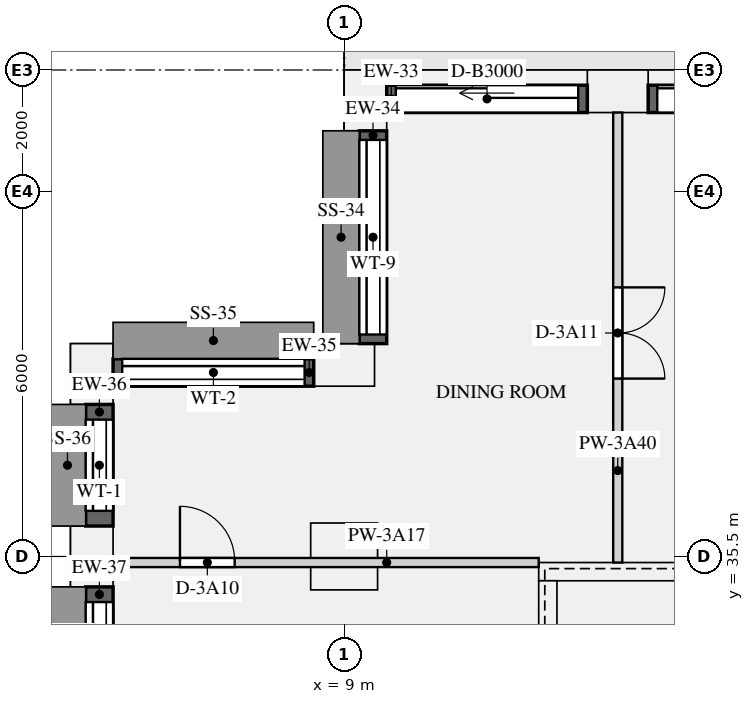
"""IFC4 building model, lengths in metres.
Left out: names, types, materials, properties, quantities, classifications, styles, units other than length and angle.
Written with IfcOpenShell. Run it as: python <this file> out.ifc"""

import sys

from ifc_helpers import new_model, si_unit, direction, frame, frame_2d, origin, origin_2d, place, context, subcontext, project, spatial, rectangle, extrude, element, fill, save


model = new_model("IFC4")
c1 = context("Model", 3, precision=1e-05, world=origin(), true_north=direction((0.0, 1.0)))
c2 = subcontext(c1, "Body", "Model", "MODEL_VIEW")
j1 = project(units=[si_unit("LENGTHUNIT", "METRE"), si_unit("PLANEANGLEUNIT", "RADIAN")], contexts=[c1])
p1 = place(None, origin())
s1 = spatial("IfcSite", under=j1, at=p1, CompositionType="ELEMENT")
p2 = place(p1, origin())
s2 = spatial("IfcBuilding", under=s1, at=p2, CompositionType="ELEMENT")
p3 = place(p2, frame((0.0, 0.0, 144.45)))
s3 = spatial("IfcBuildingStorey", under=s2, at=p3, CompositionType="ELEMENT", Elevation=144.45)
for number, where, z_axis, x_axis in (
    (1, (13.5, 43.15, 0.0), (0.0, 0.0, 1.0), (-1.0, 0.0, 0.0)),
    (2, (9.35, 43.0, 0.0), (0.0, 0.0, 1.0), (0.0, -1.0, 0.0)),
    (3, (9.0, 38.65, 0.0), (0.0, 0.0, 1.0), (-1.0, 0.0, 0.0)),
    (4, (4.85, 38.5, 0.0), (0.0, 0.0, 1.0), (0.0, -1.0, 0.0)),
    (5, (4.85, 35.5, 0.0), (0.0, 0.0, 1.0), (0.0, -1.0, 0.0)),
):
    element("IfcColumn", number, at=place(p3, frame(where, z_axis=z_axis, x_axis=x_axis)), inside=s3, PredefinedType="USERDEFINED", context=c2, shape_type="SweptSolid", body=[
        extrude(rectangle(XDim=1.0, YDim=0.7, at=origin_2d()), origin(), (0.0, 0.0, 1.0), 3.15),
    ])
p4 = place(p3, frame((9.0, 35.5, 0.0), z_axis=(0.0, 0.0, 1.0), x_axis=(1.0, 0.0, 0.0)))
e6 = element("IfcColumn", 6, at=p4, inside=s3, PredefinedType="COLUMN", context=c2, shape_type="SweptSolid", body=[
    extrude(rectangle(XDim=1.1, YDim=1.1, at=origin_2d()), origin(), (0.0, 0.0, 1.0), 3.15),
])
p5 = place(p3, frame((12.2, 35.25, 0.0), z_axis=(0.0, 0.0, 1.0), x_axis=(1.0, 0.0, 0.0)))
e7 = element("IfcWall", 7, at=p5, inside=s3, PredefinedType="SHEAR", context=c2, shape_type="SweptSolid", body=[
    extrude(rectangle(XDim=3.6, YDim=0.3, at=frame_2d((1.8, 0.0))), origin(), (0.0, 0.0, 1.0), 3.15),
])
p6 = place(p3, frame((12.35, 27.3, 0.0), z_axis=(0.0, 0.0, 1.0), x_axis=(0.0, 1.0, 0.0)))
e8 = element("IfcWall", 8, at=p6, inside=s3, PredefinedType="SHEAR", context=c2, shape_type="SweptSolid", body=[
    extrude(rectangle(XDim=7.8, YDim=0.3, at=frame_2d((3.9, 0.0))), origin(), (0.0, 0.0, 1.0), 3.15),
])
p7 = place(p3, frame((17.5, 43.025, 0.0), z_axis=(0.0, 0.0, 1.0), x_axis=(-1.0, 0.0, 0.0)))
e9 = element("IfcWall", 9, at=p7, inside=s3, PredefinedType="SOLIDWALL", context=c2, shape_type="SweptSolid", body=[
    extrude(rectangle(XDim=3.5, YDim=0.45, at=frame_2d((1.75, 0.0))), origin(), (0.0, 0.0, 1.0), 2.83),
])
p8 = place(p7, frame((0.15, 0.0, 0.0)))
e10 = element("IfcOpeningElement", 10, at=p8, cuts=e9, PredefinedType="OPENING", context=c2, shape_type="SweptSolid", body=[
    extrude(rectangle(XDim=3.2, YDim=2.3, at=frame_2d((1.6, 1.15))), frame((0.0, 0.235, 0.0), z_axis=(0.0, -1.0, 0.0), x_axis=(1.0, 0.0, 0.0)), (0.0, 0.0, 1.0), 0.47),
])
p9 = place(p3, frame((13.0, 43.025, 0.0), z_axis=(0.0, 0.0, 1.0), x_axis=(-1.0, 0.0, 0.0)))
e11 = element("IfcWall", 11, at=p9, inside=s3, PredefinedType="SOLIDWALL", context=c2, shape_type="SweptSolid", body=[
    extrude(rectangle(XDim=3.3, YDim=0.45, at=frame_2d((1.65, 0.0))), origin(), (0.0, 0.0, 1.0), 2.83),
])
p10 = place(p9, frame((0.15, 0.0, 0.0)))
e12 = element("IfcOpeningElement", 12, at=p10, cuts=e11, PredefinedType="OPENING", context=c2, shape_type="SweptSolid", body=[
    extrude(rectangle(XDim=3.0, YDim=2.3, at=frame_2d((1.5, 1.15))), frame((0.0, 0.235, 0.0), z_axis=(0.0, -1.0, 0.0), x_axis=(1.0, 0.0, 0.0)), (0.0, 0.0, 1.0), 0.47),
])
p11 = place(p3, frame((9.475, 42.5, 0.9), z_axis=(0.0, 0.0, 1.0), x_axis=(0.0, -1.0, 0.0)))
e13 = element("IfcWall", 13, at=p11, inside=s3, PredefinedType="SOLIDWALL", context=c2, shape_type="SweptSolid", body=[
    extrude(rectangle(XDim=3.5, YDim=0.45, at=frame_2d((1.75, 0.0))), origin(), (0.0, 0.0, 1.0), 1.93),
])
p12 = place(p11, frame((0.15, 0.0, 0.15)))
e14 = element("IfcOpeningElement", 14, at=p12, cuts=e13, PredefinedType="OPENING", context=c2, shape_type="SweptSolid", body=[
    extrude(rectangle(XDim=3.2, YDim=1.5, at=frame_2d((1.6, 0.75))), frame((0.0, 0.235, 0.0), z_axis=(0.0, -1.0, 0.0), x_axis=(1.0, 0.0, 0.0)), (0.0, 0.0, 1.0), 0.47),
])
p13 = place(p3, frame((8.5, 38.525, 0.9), z_axis=(0.0, 0.0, 1.0), x_axis=(-1.0, 0.0, 0.0)))
e15 = element("IfcWall", 15, at=p13, inside=s3, PredefinedType="SOLIDWALL", context=c2, shape_type="SweptSolid", body=[
    extrude(rectangle(XDim=3.3, YDim=0.45, at=frame_2d((1.65, 0.0))), origin(), (0.0, 0.0, 1.0), 1.93),
])
p14 = place(p13, frame((0.15, 0.0, 0.15)))
e16 = element("IfcOpeningElement", 16, at=p14, cuts=e15, PredefinedType="OPENING", context=c2, shape_type="SweptSolid", body=[
    extrude(rectangle(XDim=3.0, YDim=1.5, at=frame_2d((1.5, 0.75))), frame((0.0, 0.235, 0.0), z_axis=(0.0, -1.0, 0.0), x_axis=(1.0, 0.0, 0.0)), (0.0, 0.0, 1.0), 0.47),
])
p15 = place(p3, frame((4.975, 38.0, 0.9), z_axis=(0.0, 0.0, 1.0), x_axis=(0.0, -1.0, 0.0)))
e17 = element("IfcWall", 17, at=p15, inside=s3, PredefinedType="SOLIDWALL", context=c2, shape_type="SweptSolid", body=[
    extrude(rectangle(XDim=2.0, YDim=0.45, at=frame_2d((1.0, 0.0))), origin(), (0.0, 0.0, 1.0), 1.93),
])
p16 = place(p15, frame((0.25, 0.0, 0.15)))
e18 = element("IfcOpeningElement", 18, at=p16, cuts=e17, PredefinedType="OPENING", context=c2, shape_type="SweptSolid", body=[
    extrude(rectangle(XDim=1.5, YDim=1.5, at=frame_2d((0.75, 0.75))), frame((0.0, 0.235, 0.0), z_axis=(0.0, -1.0, 0.0), x_axis=(1.0, 0.0, 0.0)), (0.0, 0.0, 1.0), 0.47),
])
p17 = place(p3, frame((4.975, 35.0, 0.9), z_axis=(0.0, 0.0, 1.0), x_axis=(0.0, -1.0, 0.0)))
e19 = element("IfcWall", 19, at=p17, inside=s3, PredefinedType="SOLIDWALL", context=c2, shape_type="SweptSolid", body=[
    extrude(rectangle(XDim=2.5, YDim=0.45, at=frame_2d((1.25, 0.0))), origin(), (0.0, 0.0, 1.0), 1.93),
])
p18 = place(p17, frame((0.25, 0.0, 0.15)))
e20 = element("IfcOpeningElement", 20, at=p18, cuts=e19, PredefinedType="OPENING", context=c2, shape_type="SweptSolid", body=[
    extrude(rectangle(XDim=2.0, YDim=1.5, at=frame_2d((1.0, 0.75))), frame((0.0, 0.235, 0.0), z_axis=(0.0, -1.0, 0.0), x_axis=(1.0, 0.0, 0.0)), (0.0, 0.0, 1.0), 0.47),
])
p19 = place(p3, frame((5.2, 35.4, 0.0), z_axis=(0.0, 0.0, 1.0), x_axis=(1.0, 0.0, 0.0)))
e21 = element("IfcWall", 21, at=p19, inside=s3, PredefinedType="PARTITIONING", context=c2, shape_type="SweptSolid", body=[
    extrude(rectangle(XDim=7.0, YDim=0.15, at=frame_2d((3.5, 0.0))), origin(), (0.0, 0.0, 1.0), 2.83),
])
p20 = place(p19, frame((1.1, 0.0, 0.0)))
e22 = element("IfcOpeningElement", 22, at=p20, cuts=e21, PredefinedType="OPENING", context=c2, shape_type="SweptSolid", body=[
    extrude(rectangle(XDim=0.9, YDim=2.1, at=frame_2d((0.45, 1.05))), frame((0.0, 0.085, 0.0), z_axis=(0.0, -1.0, 0.0), x_axis=(1.0, 0.0, 0.0)), (0.0, 0.0, 1.0), 0.17),
])
p21 = place(p3, frame((13.5, 35.4, 0.0), z_axis=(0.0, 0.0, 1.0), x_axis=(0.0, 1.0, 0.0)))
e23 = element("IfcWall", 23, at=p21, inside=s3, PredefinedType="PARTITIONING", context=c2, shape_type="SweptSolid", body=[
    extrude(rectangle(XDim=7.4, YDim=0.15, at=frame_2d((3.7, 0.0))), origin(), (0.0, 0.0, 1.0), 2.83),
])
p22 = place(p21, frame((3.025, 0.0, 0.0)))
e24 = element("IfcOpeningElement", 24, at=p22, cuts=e23, PredefinedType="OPENING", context=c2, shape_type="SweptSolid", body=[
    extrude(rectangle(XDim=1.5, YDim=2.1, at=frame_2d((0.75, 1.05))), frame((0.0, 0.085, 0.0), z_axis=(0.0, -1.0, 0.0), x_axis=(1.0, 0.0, 0.0)), (0.0, 0.0, 1.0), 0.17),
])
p23 = place(p8, origin())
e25 = element("IfcDoor", 25, at=p23, inside=s3, OperationType="SLIDING_TO_LEFT", PredefinedType="DOOR", context=c2, shape_type="SweptSolid", body=[
    extrude(rectangle(XDim=3.2, YDim=2.3, at=frame_2d((1.6, 1.15))), frame((0.0, -0.07, 0.0), z_axis=(0.0, -1.0, 0.0), x_axis=(1.0, 0.0, 0.0)), (0.0, 0.0, 1.0), 0.05),
])
fill(e10, e25)
p24 = place(p10, origin())
e26 = element("IfcDoor", 26, at=p24, inside=s3, OperationType="SLIDING_TO_LEFT", PredefinedType="DOOR", context=c2, shape_type="SweptSolid", body=[
    extrude(rectangle(XDim=3.0, YDim=2.3, at=frame_2d((1.5, 1.15))), frame((0.0, -0.07, 0.0), z_axis=(0.0, -1.0, 0.0), x_axis=(1.0, 0.0, 0.0)), (0.0, 0.0, 1.0), 0.05),
])
fill(e12, e26)
p25 = place(p12, origin())
e27 = element("IfcWindow", 27, at=p25, inside=s3, PartitioningType="SINGLE_PANEL", PredefinedType="WINDOW", context=c2, shape_type="SweptSolid", body=[
    extrude(rectangle(XDim=3.2, YDim=1.5, at=frame_2d((1.6, 0.75))), frame((0.0, -0.065, 0.0), z_axis=(0.0, -1.0, 0.0), x_axis=(1.0, 0.0, 0.0)), (0.0, 0.0, 1.0), 0.06),
])
fill(e14, e27)
p26 = place(p14, origin())
e28 = element("IfcWindow", 28, at=p26, inside=s3, PartitioningType="SINGLE_PANEL", PredefinedType="WINDOW", context=c2, shape_type="SweptSolid", body=[
    extrude(rectangle(XDim=3.0, YDim=1.5, at=frame_2d((1.5, 0.75))), frame((0.0, -0.065, 0.0), z_axis=(0.0, -1.0, 0.0), x_axis=(1.0, 0.0, 0.0)), (0.0, 0.0, 1.0), 0.06),
])
fill(e16, e28)
p27 = place(p16, origin())
e29 = element("IfcWindow", 29, at=p27, inside=s3, PartitioningType="SINGLE_PANEL", PredefinedType="WINDOW", context=c2, shape_type="SweptSolid", body=[
    extrude(rectangle(XDim=1.5, YDim=1.5, at=frame_2d((0.75, 0.75))), frame((0.0, -0.065, 0.0), z_axis=(0.0, -1.0, 0.0), x_axis=(1.0, 0.0, 0.0)), (0.0, 0.0, 1.0), 0.06),
])
fill(e18, e29)
p28 = place(p18, origin())
e30 = element("IfcWindow", 30, at=p28, inside=s3, PartitioningType="SINGLE_PANEL", PredefinedType="WINDOW", context=c2, shape_type="SweptSolid", body=[
    extrude(rectangle(XDim=2.0, YDim=1.5, at=frame_2d((1.0, 0.75))), frame((0.0, -0.065, 0.0), z_axis=(0.0, -1.0, 0.0), x_axis=(1.0, 0.0, 0.0)), (0.0, 0.0, 1.0), 0.06),
])
fill(e20, e30)
p29 = place(p20, origin())
e31 = element("IfcDoor", 31, at=p29, inside=s3, OperationType="SINGLE_SWING_LEFT", PredefinedType="DOOR", context=c2, shape_type="SweptSolid", body=[
    extrude(rectangle(XDim=0.9, YDim=2.1, at=frame_2d((0.45, 1.05))), frame((0.0, 0.025, 0.0), z_axis=(0.0, -1.0, 0.0), x_axis=(1.0, 0.0, 0.0)), (0.0, 0.0, 1.0), 0.05),
])
fill(e22, e31)
p30 = place(p22, frame((1.5, 0.0, 0.0), z_axis=(0.0, 0.0, 1.0), x_axis=(-1.0, 0.0, 0.0)))
e32 = element("IfcDoor", 32, at=p30, inside=s3, OperationType="DOUBLE_DOOR_SINGLE_SWING", PredefinedType="DOOR", context=c2, shape_type="SweptSolid", body=[
    extrude(rectangle(XDim=1.5, YDim=2.1, at=frame_2d((0.75, 1.05))), frame((0.0, 0.025, 0.0), z_axis=(0.0, -1.0, 0.0), x_axis=(1.0, 0.0, 0.0)), (0.0, 0.0, 1.0), 0.05),
])
fill(e24, e32)
save(model, sys.argv[1])
